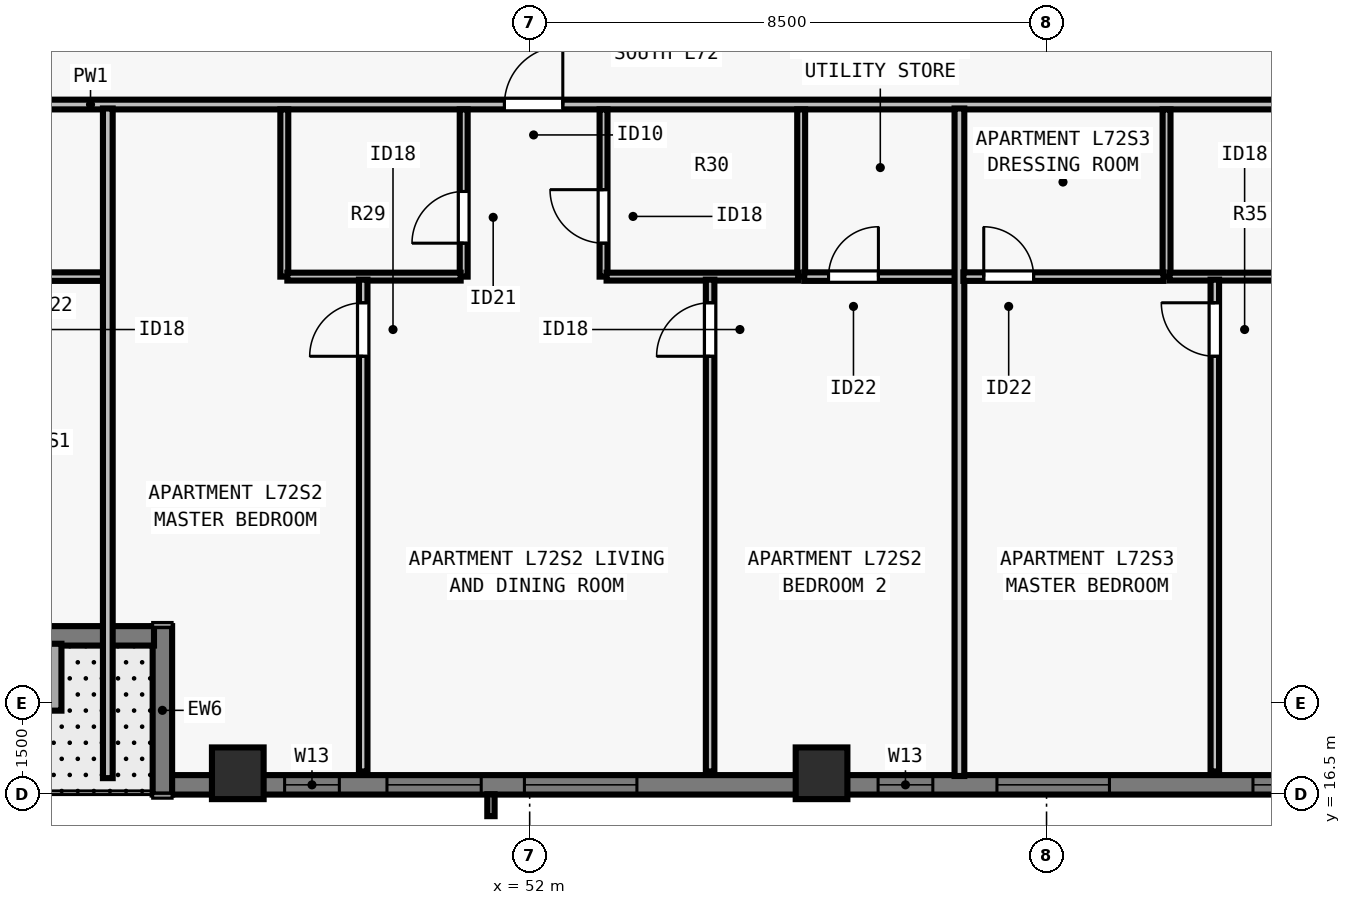
"""IFC4 building model, lengths in metres.
Left out: names, types, materials, properties, quantities, classifications, styles, units other than length and angle.
Written with IfcOpenShell. Run it as: python <this file> out.ifc"""

import sys

from ifc_helpers import new_model, si_unit, direction, frame, frame_2d, origin, origin_2d, place, context, subcontext, project, spatial, rectangle, extrude, element, fill, save


model = new_model("IFC4")
c1 = context("Model", 3, precision=1e-05, world=origin(), true_north=direction((0.0, 1.0)))
c2 = subcontext(c1, "Body", "Model", "MODEL_VIEW")
j1 = project(units=[si_unit("LENGTHUNIT", "METRE"), si_unit("PLANEANGLEUNIT", "RADIAN")], contexts=[c1])
p1 = place(None, origin())
s1 = spatial("IfcSite", under=j1, at=p1, CompositionType="ELEMENT")
p2 = place(p1, origin())
s2 = spatial("IfcBuilding", under=s1, at=p2, CompositionType="ELEMENT")
p3 = place(p2, frame((0.0, 0.0, 262.0)))
s3 = spatial("IfcBuildingStorey", under=s2, at=p3, CompositionType="ELEMENT", Elevation=262.0)
for number, where, z_axis, x_axis in (
    (1, (47.2, 16.85, 0.0), (0.0, 0.0, 1.0), (1.0, 0.0, 0.0)),
    (2, (56.8, 16.85, 0.0), (0.0, 0.0, 1.0), (1.0, 0.0, 0.0)),
):
    element("IfcColumn", number, at=place(p3, frame(where, z_axis=z_axis, x_axis=x_axis)), inside=s3, PredefinedType="COLUMN", context=c2, shape_type="SweptSolid", body=[
        extrude(rectangle(XDim=0.85, YDim=0.85, at=origin_2d()), origin(), (0.0, 0.0, 1.0), 3.5),
    ])
p4 = place(p3, frame((69.5, 16.66, 0.0), z_axis=(0.0, 0.0, 1.0), x_axis=(-1.0, 0.0, 0.0)))
e3 = element("IfcWall", 3, at=p4, inside=s3, PredefinedType="SOLIDWALL", context=c2, shape_type="SweptSolid", body=[
    extrude(rectangle(XDim=23.402, YDim=0.32, at=frame_2d((11.701, 0.0))), origin(), (0.0, 0.0, 1.0), 3.29),
])
p5 = place(p4, frame((4.055, 0.0, 0.8)))
e4 = element("IfcOpeningElement", 4, at=p5, cuts=e3, PredefinedType="OPENING", context=c2, shape_type="SweptSolid", body=[
    extrude(rectangle(XDim=1.55, YDim=1.678, at=frame_2d((0.775, 0.839))), frame((0.0, 0.17, 0.0), z_axis=(0.0, -1.0, 0.0), x_axis=(1.0, 0.0, 0.0)), (0.0, 0.0, 1.0), 0.34),
])
p6 = place(p4, frame((7.966, 0.0, 0.8)))
e5 = element("IfcOpeningElement", 5, at=p6, cuts=e3, PredefinedType="OPENING", context=c2, shape_type="SweptSolid", body=[
    extrude(rectangle(XDim=1.85, YDim=1.678, at=frame_2d((0.925, 0.839))), frame((0.0, 0.17, 0.0), z_axis=(0.0, -1.0, 0.0), x_axis=(1.0, 0.0, 0.0)), (0.0, 0.0, 1.0), 0.34),
])
p7 = place(p4, frame((15.736, 0.0, 0.8)))
e6 = element("IfcOpeningElement", 6, at=p7, cuts=e3, PredefinedType="OPENING", context=c2, shape_type="SweptSolid", body=[
    extrude(rectangle(XDim=1.85, YDim=1.678, at=frame_2d((0.925, 0.839))), frame((0.0, 0.17, 0.0), z_axis=(0.0, -1.0, 0.0), x_axis=(1.0, 0.0, 0.0)), (0.0, 0.0, 1.0), 0.34),
])
p8 = place(p4, frame((18.297, 0.0, 0.8)))
e7 = element("IfcOpeningElement", 7, at=p8, cuts=e3, PredefinedType="OPENING", context=c2, shape_type="SweptSolid", body=[
    extrude(rectangle(XDim=1.55, YDim=1.678, at=frame_2d((0.775, 0.839))), frame((0.0, 0.17, 0.0), z_axis=(0.0, -1.0, 0.0), x_axis=(1.0, 0.0, 0.0)), (0.0, 0.0, 1.0), 0.34),
])
p9 = place(p4, frame((20.63, 0.0, 0.8)))
e8 = element("IfcOpeningElement", 8, at=p9, cuts=e3, PredefinedType="OPENING", context=c2, shape_type="SweptSolid", body=[
    extrude(rectangle(XDim=0.9, YDim=1.678, at=frame_2d((0.45, 0.839))), frame((0.0, 0.17, 0.0), z_axis=(0.0, -1.0, 0.0), x_axis=(1.0, 0.0, 0.0)), (0.0, 0.0, 1.0), 0.34),
])
p10 = place(p4, frame((10.87, 0.0, 0.8)))
e9 = element("IfcOpeningElement", 9, at=p10, cuts=e3, PredefinedType="OPENING", context=c2, shape_type="SweptSolid", body=[
    extrude(rectangle(XDim=0.9, YDim=1.678, at=frame_2d((0.45, 0.839))), frame((0.0, 0.17, 0.0), z_axis=(0.0, -1.0, 0.0), x_axis=(1.0, 0.0, 0.0)), (0.0, 0.0, 1.0), 0.34),
])
p11 = place(p3, frame((45.96, 16.5, 0.0), z_axis=(0.0, 0.0, 1.0), x_axis=(0.0, 1.0, 0.0)))
e10 = element("IfcWall", 10, at=p11, inside=s3, PredefinedType="SOLIDWALL", context=c2, shape_type="SweptSolid", body=[
    extrude(rectangle(XDim=2.77, YDim=0.32, at=frame_2d((1.385, 0.0))), origin(), (0.0, 0.0, 1.0), 3.29),
])
p12 = place(p3, frame((45.822, 19.11, 0.0), z_axis=(0.0, 0.0, 1.0), x_axis=(-1.0, 0.0, 0.0)))
e11 = element("IfcWall", 11, at=p12, inside=s3, PredefinedType="SOLIDWALL", context=c2, shape_type="SweptSolid", body=[
    extrude(rectangle(XDim=5.742, YDim=0.32, at=frame_2d((2.871, 0.0))), origin(), (0.0, 0.0, 1.0), 3.29),
])
p13 = place(p12, frame((2.31, 0.0, 0.0)))
e12 = element("IfcOpeningElement", 12, at=p13, cuts=e11, PredefinedType="OPENING", context=c2, shape_type="SweptSolid", body=[
    extrude(rectangle(XDim=1.0, YDim=2.15, at=frame_2d((0.5, 1.075))), frame((0.0, 0.17, 0.0), z_axis=(0.0, -1.0, 0.0), x_axis=(1.0, 0.0, 0.0)), (0.0, 0.0, 1.0), 0.34),
])
p14 = place(p3, frame((29.805, 27.847, 0.0), z_axis=(0.0, 0.0, 1.0), x_axis=(1.0, 0.0, 0.0)))
e13 = element("IfcWall", 13, at=p14, inside=s3, PredefinedType="PARTITIONING", context=c2, shape_type="SweptSolid", body=[
    extrude(rectangle(XDim=44.39, YDim=0.16, at=frame_2d((22.195, 0.0))), origin(), (0.0, 0.0, 1.0), 2.958),
])
p15 = place(p14, frame((7.206, 0.0, 0.0)))
e14 = element("IfcOpeningElement", 14, at=p15, cuts=e13, PredefinedType="OPENING", context=c2, shape_type="SweptSolid", body=[
    extrude(rectangle(XDim=0.96, YDim=2.18, at=frame_2d((0.48, 1.09))), frame((0.0, 0.09, 0.0), z_axis=(0.0, -1.0, 0.0), x_axis=(1.0, 0.0, 0.0)), (0.0, 0.0, 1.0), 0.18),
])
p16 = place(p14, frame((21.78, 0.0, 0.0)))
e15 = element("IfcOpeningElement", 15, at=p16, cuts=e13, PredefinedType="OPENING", context=c2, shape_type="SweptSolid", body=[
    extrude(rectangle(XDim=0.96, YDim=2.18, at=frame_2d((0.48, 1.09))), frame((0.0, 0.09, 0.0), z_axis=(0.0, -1.0, 0.0), x_axis=(1.0, 0.0, 0.0)), (0.0, 0.0, 1.0), 0.18),
])
p17 = place(p14, frame((36.289, 0.0, 0.0)))
e16 = element("IfcOpeningElement", 16, at=p17, cuts=e13, PredefinedType="OPENING", context=c2, shape_type="SweptSolid", body=[
    extrude(rectangle(XDim=0.96, YDim=2.18, at=frame_2d((0.48, 1.09))), frame((0.0, 0.09, 0.0), z_axis=(0.0, -1.0, 0.0), x_axis=(1.0, 0.0, 0.0)), (0.0, 0.0, 1.0), 0.18),
])
p18 = place(p3, frame((41.941, 25.018, 0.0), z_axis=(0.0, 0.0, 1.0), x_axis=(1.0, 0.0, 0.0)))
e17 = element("IfcWall", 17, at=p18, inside=s3, PredefinedType="PARTITIONING", context=c2, shape_type="SweptSolid", body=[
    extrude(rectangle(XDim=3.171, YDim=0.14, at=frame_2d((1.586, 0.0))), origin(), (0.0, 0.0, 1.0), 3.29),
])
p19 = place(p18, frame((0.4, 0.0, 0.0)))
e18 = element("IfcOpeningElement", 18, at=p19, cuts=e17, PredefinedType="OPENING", context=c2, shape_type="SweptSolid", body=[
    extrude(rectangle(XDim=0.82, YDim=2.1, at=frame_2d((0.41, 1.05))), frame((0.0, 0.08, 0.0), z_axis=(0.0, -1.0, 0.0), x_axis=(1.0, 0.0, 0.0)), (0.0, 0.0, 1.0), 0.16),
])
p20 = place(p3, frame((45.062, 16.77, 0.0), z_axis=(0.0, 0.0, 1.0), x_axis=(0.0, 1.0, 0.0)))
e19 = element("IfcWall", 19, at=p20, inside=s3, PredefinedType="PARTITIONING", context=c2, shape_type="SweptSolid", body=[
    extrude(rectangle(XDim=11.012, YDim=0.16, at=frame_2d((5.506, 0.0))), origin(), (0.0, 0.0, 1.0), 3.29),
])
p21 = place(p3, frame((47.965, 25.018, 0.0), z_axis=(0.0, 0.0, 1.0), x_axis=(0.0, 1.0, 0.0)))
e20 = element("IfcWall", 20, at=p21, inside=s3, PredefinedType="PLUMBINGWALL", context=c2, shape_type="SweptSolid", body=[
    extrude(rectangle(XDim=2.75, YDim=0.13, at=frame_2d((1.375, 0.0))), origin(), (0.0, 0.0, 1.0), 3.29),
])
p22 = place(p3, frame((50.915, 25.018, 0.0), z_axis=(0.0, 0.0, 1.0), x_axis=(0.0, 1.0, 0.0)))
e21 = element("IfcWall", 21, at=p22, inside=s3, PredefinedType="PLUMBINGWALL", context=c2, shape_type="SweptSolid", body=[
    extrude(rectangle(XDim=2.75, YDim=0.13, at=frame_2d((1.375, 0.0))), origin(), (0.0, 0.0, 1.0), 3.29),
])
p23 = place(p22, frame((0.55, 0.0, 0.0)))
e22 = element("IfcOpeningElement", 22, at=p23, cuts=e21, PredefinedType="OPENING", context=c2, shape_type="SweptSolid", body=[
    extrude(rectangle(XDim=0.85, YDim=2.08, at=frame_2d((0.425, 1.04))), frame((0.0, 0.075, 0.0), z_axis=(0.0, -1.0, 0.0), x_axis=(1.0, 0.0, 0.0)), (0.0, 0.0, 1.0), 0.15),
])
p24 = place(p3, frame((48.015, 25.018, 0.0), z_axis=(0.0, 0.0, 1.0), x_axis=(1.0, 0.0, 0.0)))
e23 = element("IfcWall", 23, at=p24, inside=s3, PredefinedType="PLUMBINGWALL", context=c2, shape_type="SweptSolid", body=[
    extrude(rectangle(XDim=2.85, YDim=0.13, at=frame_2d((1.425, 0.0))), origin(), (0.0, 0.0, 1.0), 3.29),
])
p25 = place(p3, frame((56.465, 25.018, 0.0), z_axis=(0.0, 0.0, 1.0), x_axis=(0.0, 1.0, 0.0)))
e24 = element("IfcWall", 24, at=p25, inside=s3, PredefinedType="PLUMBINGWALL", context=c2, shape_type="SweptSolid", body=[
    extrude(rectangle(XDim=2.75, YDim=0.13, at=frame_2d((1.375, 0.0))), origin(), (0.0, 0.0, 1.0), 3.29),
])
p26 = place(p3, frame((53.215, 25.018, 0.0), z_axis=(0.0, 0.0, 1.0), x_axis=(0.0, 1.0, 0.0)))
e25 = element("IfcWall", 25, at=p26, inside=s3, PredefinedType="PLUMBINGWALL", context=c2, shape_type="SweptSolid", body=[
    extrude(rectangle(XDim=2.75, YDim=0.13, at=frame_2d((1.375, 0.0))), origin(), (0.0, 0.0, 1.0), 2.958),
])
p27 = place(p26, frame((0.55, 0.0, 0.0)))
e26 = element("IfcOpeningElement", 26, at=p27, cuts=e25, PredefinedType="OPENING", context=c2, shape_type="SweptSolid", body=[
    extrude(rectangle(XDim=0.88, YDim=2.1, at=frame_2d((0.44, 1.05))), frame((0.0, 0.075, 0.0), z_axis=(0.0, -1.0, 0.0), x_axis=(1.0, 0.0, 0.0)), (0.0, 0.0, 1.0), 0.15),
])
p28 = place(p3, frame((53.265, 25.018, 0.0), z_axis=(0.0, 0.0, 1.0), x_axis=(1.0, 0.0, 0.0)))
e27 = element("IfcWall", 27, at=p28, inside=s3, PredefinedType="PLUMBINGWALL", context=c2, shape_type="SweptSolid", body=[
    extrude(rectangle(XDim=3.15, YDim=0.13, at=frame_2d((1.575, 0.0))), origin(), (0.0, 0.0, 1.0), 3.29),
])
p29 = place(p3, frame((49.262, 16.88, 0.0), z_axis=(0.0, 0.0, 1.0), x_axis=(0.0, 1.0, 0.0)))
e28 = element("IfcWall", 28, at=p29, inside=s3, PredefinedType="PARTITIONING", context=c2, shape_type="SweptSolid", body=[
    extrude(rectangle(XDim=8.088, YDim=0.14, at=frame_2d((4.044, 0.0))), origin(), (0.0, 0.0, 1.0), 2.958),
])
p30 = place(p29, frame((6.827, 0.0, 0.0)))
e29 = element("IfcOpeningElement", 29, at=p30, cuts=e28, PredefinedType="OPENING", context=c2, shape_type="SweptSolid", body=[
    extrude(rectangle(XDim=0.88, YDim=2.1, at=frame_2d((0.44, 1.05))), frame((0.0, 0.08, 0.0), z_axis=(0.0, -1.0, 0.0), x_axis=(1.0, 0.0, 0.0)), (0.0, 0.0, 1.0), 0.16),
])
p31 = place(p3, frame((54.968, 16.88, 0.0), z_axis=(0.0, 0.0, 1.0), x_axis=(0.0, 1.0, 0.0)))
e30 = element("IfcWall", 30, at=p31, inside=s3, PredefinedType="PARTITIONING", context=c2, shape_type="SweptSolid", body=[
    extrude(rectangle(XDim=8.088, YDim=0.14, at=frame_2d((4.044, 0.0))), origin(), (0.0, 0.0, 1.0), 3.29),
])
p32 = place(p31, frame((6.827, 0.0, 0.0)))
e31 = element("IfcOpeningElement", 31, at=p32, cuts=e30, PredefinedType="OPENING", context=c2, shape_type="SweptSolid", body=[
    extrude(rectangle(XDim=0.88, YDim=2.1, at=frame_2d((0.44, 1.05))), frame((0.0, 0.08, 0.0), z_axis=(0.0, -1.0, 0.0), x_axis=(1.0, 0.0, 0.0)), (0.0, 0.0, 1.0), 0.16),
])
p33 = place(p3, frame((56.515, 25.018, 0.0), z_axis=(0.0, 0.0, 1.0), x_axis=(1.0, 0.0, 0.0)))
e32 = element("IfcWall", 32, at=p33, inside=s3, PredefinedType="PARTITIONING", context=c2, shape_type="SweptSolid", body=[
    extrude(rectangle(XDim=2.603, YDim=0.14, at=frame_2d((1.301, 0.0))), origin(), (0.0, 0.0, 1.0), 3.29),
])
p34 = place(p33, frame((0.4, 0.0, 0.0)))
e33 = element("IfcOpeningElement", 33, at=p34, cuts=e32, PredefinedType="OPENING", context=c2, shape_type="SweptSolid", body=[
    extrude(rectangle(XDim=0.82, YDim=2.1, at=frame_2d((0.41, 1.05))), frame((0.0, 0.08, 0.0), z_axis=(0.0, -1.0, 0.0), x_axis=(1.0, 0.0, 0.0)), (0.0, 0.0, 1.0), 0.16),
])
p35 = place(p3, frame((59.067, 16.805, 0.0), z_axis=(0.0, 0.0, 1.0), x_axis=(0.0, 1.0, 0.0)))
e34 = element("IfcWall", 34, at=p35, inside=s3, PredefinedType="PARTITIONING", context=c2, shape_type="SweptSolid", body=[
    extrude(rectangle(XDim=10.978, YDim=0.16, at=frame_2d((5.489, 0.0))), origin(), (0.0, 0.0, 1.0), 3.29),
])
p36 = place(p3, frame((62.474, 25.018, 0.0), z_axis=(0.0, 0.0, 1.0), x_axis=(0.0, 1.0, 0.0)))
e35 = element("IfcWall", 35, at=p36, inside=s3, PredefinedType="PLUMBINGWALL", context=c2, shape_type="SweptSolid", body=[
    extrude(rectangle(XDim=2.75, YDim=0.13, at=frame_2d((1.375, 0.0))), origin(), (0.0, 0.0, 1.0), 2.573),
])
p37 = place(p3, frame((62.524, 25.018, 0.0), z_axis=(0.0, 0.0, 1.0), x_axis=(1.0, 0.0, 0.0)))
e36 = element("IfcWall", 36, at=p37, inside=s3, PredefinedType="PLUMBINGWALL", context=c2, shape_type="SweptSolid", body=[
    extrude(rectangle(XDim=2.85, YDim=0.13, at=frame_2d((1.425, 0.0))), origin(), (0.0, 0.0, 1.0), 3.29),
])
p38 = place(p3, frame((63.268, 16.88, 0.0), z_axis=(0.0, 0.0, 1.0), x_axis=(0.0, 1.0, 0.0)))
e37 = element("IfcWall", 37, at=p38, inside=s3, PredefinedType="PARTITIONING", context=c2, shape_type="SweptSolid", body=[
    extrude(rectangle(XDim=8.088, YDim=0.14, at=frame_2d((4.044, 0.0))), origin(), (0.0, 0.0, 1.0), 3.29),
])
p39 = place(p38, frame((6.827, 0.0, 0.0)))
e38 = element("IfcOpeningElement", 38, at=p39, cuts=e37, PredefinedType="OPENING", context=c2, shape_type="SweptSolid", body=[
    extrude(rectangle(XDim=0.88, YDim=2.1, at=frame_2d((0.44, 1.05))), frame((0.0, 0.08, 0.0), z_axis=(0.0, -1.0, 0.0), x_axis=(1.0, 0.0, 0.0)), (0.0, 0.0, 1.0), 0.16),
])
p40 = place(p3, frame((59.133, 25.018, 0.0), z_axis=(0.0, 0.0, 1.0), x_axis=(1.0, 0.0, 0.0)))
e39 = element("IfcWall", 39, at=p40, inside=s3, PredefinedType="PARTITIONING", context=c2, shape_type="SweptSolid", body=[
    extrude(rectangle(XDim=3.291, YDim=0.14, at=frame_2d((1.646, 0.0))), origin(), (0.0, 0.0, 1.0), 3.29),
])
p41 = place(p40, frame((0.335, 0.0, 0.0)))
e40 = element("IfcOpeningElement", 40, at=p41, cuts=e39, PredefinedType="OPENING", context=c2, shape_type="SweptSolid", body=[
    extrude(rectangle(XDim=0.82, YDim=2.1, at=frame_2d((0.41, 1.05))), frame((0.0, 0.08, 0.0), z_axis=(0.0, -1.0, 0.0), x_axis=(1.0, 0.0, 0.0)), (0.0, 0.0, 1.0), 0.16),
])
p42 = place(p5, origin())
e41 = element("IfcWindow", 41, at=p42, inside=s3, PartitioningType="SINGLE_PANEL", PredefinedType="WINDOW", context=c2, shape_type="SweptSolid", body=[
    extrude(rectangle(XDim=1.55, YDim=1.678, at=frame_2d((0.775, 0.839))), frame((0.0, -0.05, 0.0), z_axis=(0.0, -1.0, 0.0), x_axis=(1.0, 0.0, 0.0)), (0.0, 0.0, 1.0), 0.06),
])
fill(e4, e41)
p43 = place(p6, origin())
e42 = element("IfcWindow", 42, at=p43, inside=s3, PartitioningType="SINGLE_PANEL", PredefinedType="WINDOW", context=c2, shape_type="SweptSolid", body=[
    extrude(rectangle(XDim=1.85, YDim=1.678, at=frame_2d((0.925, 0.839))), frame((0.0, -0.05, 0.0), z_axis=(0.0, -1.0, 0.0), x_axis=(1.0, 0.0, 0.0)), (0.0, 0.0, 1.0), 0.06),
])
fill(e5, e42)
p44 = place(p7, origin())
e43 = element("IfcWindow", 43, at=p44, inside=s3, PartitioningType="SINGLE_PANEL", PredefinedType="WINDOW", context=c2, shape_type="SweptSolid", body=[
    extrude(rectangle(XDim=1.85, YDim=1.678, at=frame_2d((0.925, 0.839))), frame((0.0, -0.05, 0.0), z_axis=(0.0, -1.0, 0.0), x_axis=(1.0, 0.0, 0.0)), (0.0, 0.0, 1.0), 0.06),
])
fill(e6, e43)
p45 = place(p8, origin())
e44 = element("IfcWindow", 44, at=p45, inside=s3, PartitioningType="SINGLE_PANEL", PredefinedType="WINDOW", context=c2, shape_type="SweptSolid", body=[
    extrude(rectangle(XDim=1.55, YDim=1.678, at=frame_2d((0.775, 0.839))), frame((0.0, -0.05, 0.0), z_axis=(0.0, -1.0, 0.0), x_axis=(1.0, 0.0, 0.0)), (0.0, 0.0, 1.0), 0.06),
])
fill(e7, e44)
p46 = place(p9, origin())
e45 = element("IfcWindow", 45, at=p46, inside=s3, PartitioningType="SINGLE_PANEL", PredefinedType="WINDOW", context=c2, shape_type="SweptSolid", body=[
    extrude(rectangle(XDim=0.9, YDim=1.678, at=frame_2d((0.45, 0.839))), frame((0.0, -0.04, 0.0), z_axis=(0.0, -1.0, 0.0), x_axis=(1.0, 0.0, 0.0)), (0.0, 0.0, 1.0), 0.06),
])
fill(e8, e45)
p47 = place(p10, origin())
e46 = element("IfcWindow", 46, at=p47, inside=s3, PartitioningType="SINGLE_PANEL", PredefinedType="WINDOW", context=c2, shape_type="SweptSolid", body=[
    extrude(rectangle(XDim=0.9, YDim=1.678, at=frame_2d((0.45, 0.839))), frame((0.0, -0.04, 0.0), z_axis=(0.0, -1.0, 0.0), x_axis=(1.0, 0.0, 0.0)), (0.0, 0.0, 1.0), 0.06),
])
fill(e9, e46)
p48 = place(p23, origin())
e47 = element("IfcDoor", 47, at=p48, inside=s3, OperationType="SINGLE_SWING_LEFT", PredefinedType="DOOR", context=c2, shape_type="SweptSolid", body=[
    extrude(rectangle(XDim=0.85, YDim=2.08, at=frame_2d((0.425, 1.04))), frame((0.0, 0.025, 0.0), z_axis=(0.0, -1.0, 0.0), x_axis=(1.0, 0.0, 0.0)), (0.0, 0.0, 1.0), 0.05),
])
fill(e22, e47)
p49 = place(p27, origin())
e48 = element("IfcDoor", 48, at=p49, inside=s3, OperationType="SINGLE_SWING_RIGHT", PredefinedType="DOOR", context=c2, shape_type="SweptSolid", body=[
    extrude(rectangle(XDim=0.88, YDim=2.1, at=frame_2d((0.44, 1.05))), frame((0.0, 0.025, 0.0), z_axis=(0.0, -1.0, 0.0), x_axis=(1.0, 0.0, 0.0)), (0.0, 0.0, 1.0), 0.05),
])
fill(e26, e48)
p50 = place(p30, origin())
e49 = element("IfcDoor", 49, at=p50, inside=s3, OperationType="SINGLE_SWING_LEFT", PredefinedType="DOOR", context=c2, shape_type="SweptSolid", body=[
    extrude(rectangle(XDim=0.88, YDim=2.1, at=frame_2d((0.44, 1.05))), frame((0.0, 0.025, 0.0), z_axis=(0.0, -1.0, 0.0), x_axis=(1.0, 0.0, 0.0)), (0.0, 0.0, 1.0), 0.05),
])
fill(e29, e49)
p51 = place(p34, origin())
e50 = element("IfcDoor", 50, at=p51, inside=s3, OperationType="SINGLE_SWING_RIGHT", PredefinedType="DOOR", context=c2, shape_type="SweptSolid", body=[
    extrude(rectangle(XDim=0.82, YDim=2.1, at=frame_2d((0.41, 1.05))), frame((0.0, 0.025, 0.0), z_axis=(0.0, -1.0, 0.0), x_axis=(1.0, 0.0, 0.0)), (0.0, 0.0, 1.0), 0.05),
])
fill(e33, e50)
p52 = place(p32, origin())
e51 = element("IfcDoor", 51, at=p52, inside=s3, OperationType="SINGLE_SWING_LEFT", PredefinedType="DOOR", context=c2, shape_type="SweptSolid", body=[
    extrude(rectangle(XDim=0.88, YDim=2.1, at=frame_2d((0.44, 1.05))), frame((0.0, 0.025, 0.0), z_axis=(0.0, -1.0, 0.0), x_axis=(1.0, 0.0, 0.0)), (0.0, 0.0, 1.0), 0.05),
])
fill(e31, e51)
p53 = place(p16, origin())
e52 = element("IfcDoor", 52, at=p53, inside=s3, OperationType="SINGLE_SWING_RIGHT", PredefinedType="DOOR", context=c2, shape_type="SweptSolid", body=[
    extrude(rectangle(XDim=0.96, YDim=2.18, at=frame_2d((0.48, 1.09))), frame((0.0, 0.025, 0.0), z_axis=(0.0, -1.0, 0.0), x_axis=(1.0, 0.0, 0.0)), (0.0, 0.0, 1.0), 0.05),
])
fill(e15, e52)
p54 = place(p41, origin())
e53 = element("IfcDoor", 53, at=p54, inside=s3, OperationType="SINGLE_SWING_LEFT", PredefinedType="DOOR", context=c2, shape_type="SweptSolid", body=[
    extrude(rectangle(XDim=0.82, YDim=2.1, at=frame_2d((0.41, 1.05))), frame((0.0, 0.025, 0.0), z_axis=(0.0, -1.0, 0.0), x_axis=(1.0, 0.0, 0.0)), (0.0, 0.0, 1.0), 0.05),
])
fill(e40, e53)
p55 = place(p39, origin())
e54 = element("IfcDoor", 54, at=p55, inside=s3, OperationType="SINGLE_SWING_RIGHT", PredefinedType="DOOR", context=c2, shape_type="SweptSolid", body=[
    extrude(rectangle(XDim=0.88, YDim=2.1, at=frame_2d((0.44, 1.05))), frame((0.0, 0.025, 0.0), z_axis=(0.0, -1.0, 0.0), x_axis=(1.0, 0.0, 0.0)), (0.0, 0.0, 1.0), 0.05),
])
fill(e38, e54)
save(model, sys.argv[1])
